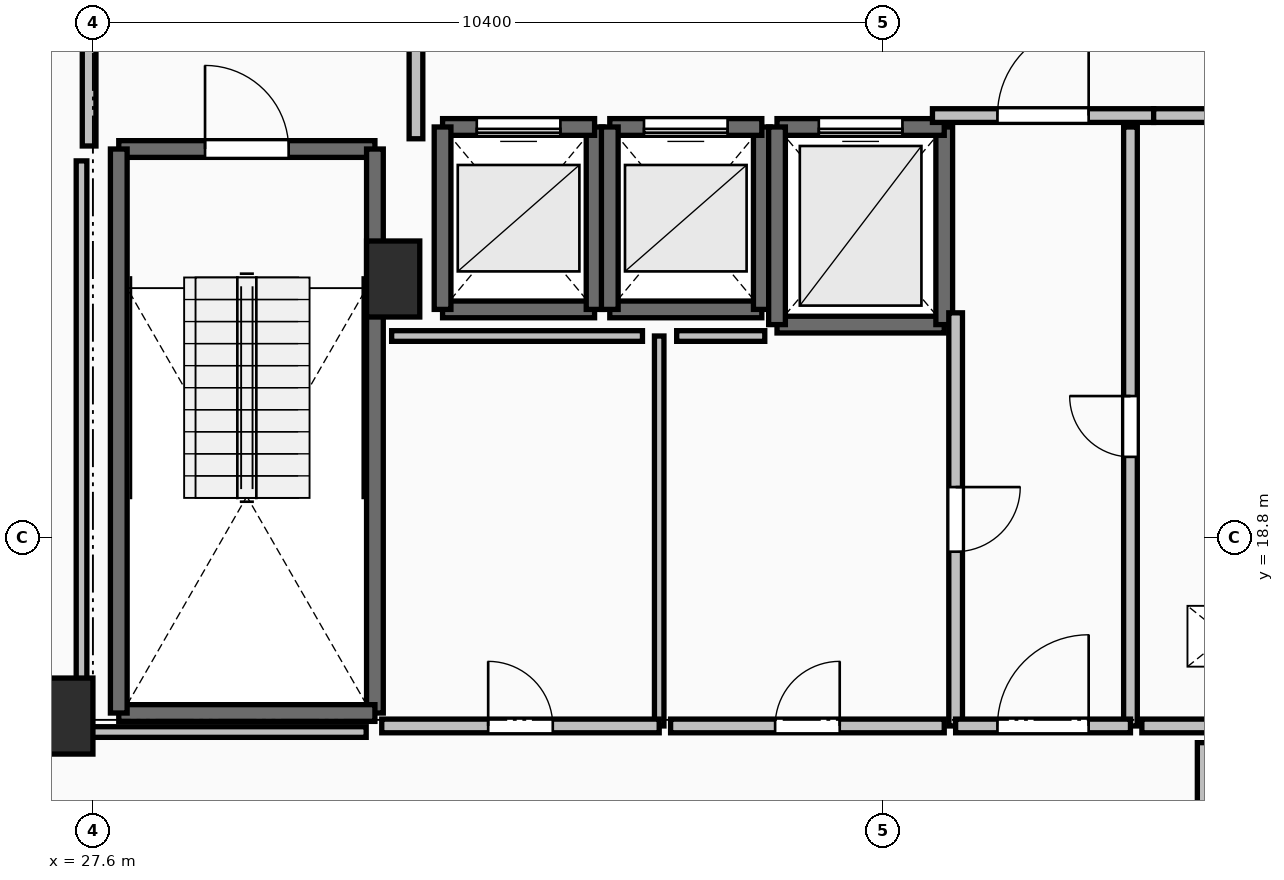
"""IFC4 building model, lengths in metres.
Left out: names, types, materials, properties, quantities, classifications, styles, units other than length and angle.
Written with IfcOpenShell. Run it as: python <this file> out.ifc"""

import sys

from ifc_helpers import new_model, si_unit, direction, frame, frame_2d, origin, origin_2d, place, context, subcontext, project, spatial, rectangle, extrude, element, fill, save


model = new_model("IFC4")
c1 = context("Model", 3, precision=1e-05, world=origin(), true_north=direction((0.0, 1.0)))
c2 = subcontext(c1, "Body", "Model", "MODEL_VIEW")
j1 = project(units=[si_unit("LENGTHUNIT", "METRE"), si_unit("PLANEANGLEUNIT", "RADIAN")], contexts=[c1])
p1 = place(None, origin())
s1 = spatial("IfcSite", under=j1, at=p1, CompositionType="ELEMENT")
p2 = place(p1, origin())
s2 = spatial("IfcBuilding", under=s1, at=p2, CompositionType="ELEMENT")
p3 = place(p2, frame((0.0, 0.0, 203.65)))
s3 = spatial("IfcBuildingStorey", under=s2, at=p3, CompositionType="ELEMENT", Elevation=203.65)
for number, where, z_axis, x_axis in (
    (1, (27.25, 16.45, 0.0), (0.0, 0.0, 1.0), (1.0, 0.0, 0.0)),
    (2, (31.55, 22.2, 0.0), (0.0, 0.0, 1.0), (1.0, 0.0, 0.0)),
):
    element("IfcColumn", number, at=place(p3, frame(where, z_axis=z_axis, x_axis=x_axis)), inside=s3, PredefinedType="PILASTER", context=c2, shape_type="SweptSolid", body=[
        extrude(rectangle(XDim=0.7, YDim=1.0, at=origin_2d()), origin(), (0.0, 0.0, 1.0), 3.55),
    ])
p4 = place(p3, frame((27.94, 23.91, 0.0), z_axis=(0.0, 0.0, 1.0), x_axis=(1.0, 0.0, 0.0)))
e3 = element("IfcWall", 3, at=p4, inside=s3, PredefinedType="SOLIDWALL", context=c2, shape_type="SweptSolid", body=[
    extrude(rectangle(XDim=3.37, YDim=0.22, at=frame_2d((1.685, 0.0))), origin(), (0.0, 0.0, 1.0), 3.29),
])
p5 = place(p4, frame((1.135, 0.0, 0.0)))
e4 = element("IfcOpeningElement", 4, at=p5, cuts=e3, PredefinedType="OPENING", context=c2, shape_type="SweptSolid", body=[
    extrude(rectangle(XDim=1.1, YDim=2.15, at=frame_2d((0.55, 1.075))), frame((0.0, 0.125, 0.0), z_axis=(0.0, -1.0, 0.0), x_axis=(1.0, 0.0, 0.0)), (0.0, 0.0, 1.0), 0.25),
])
p6 = place(p3, frame((31.31, 23.91, 0.0), z_axis=(0.0, 0.0, 1.0), x_axis=(0.0, -1.0, 0.0)))
e5 = element("IfcWall", 5, at=p6, inside=s3, PredefinedType="SOLIDWALL", context=c2, shape_type="SweptSolid", body=[
    extrude(rectangle(XDim=7.42, YDim=0.22, at=frame_2d((3.71, 0.0))), origin(), (0.0, 0.0, 1.0), 3.29),
])
p7 = place(p3, frame((31.31, 16.49, 0.0), z_axis=(0.0, 0.0, 1.0), x_axis=(-1.0, 0.0, 0.0)))
e6 = element("IfcWall", 6, at=p7, inside=s3, PredefinedType="SOLIDWALL", context=c2, shape_type="SweptSolid", body=[
    extrude(rectangle(XDim=3.37, YDim=0.22, at=frame_2d((1.685, 0.0))), origin(), (0.0, 0.0, 1.0), 3.29),
])
p8 = place(p3, frame((27.94, 16.49, 0.0), z_axis=(0.0, 0.0, 1.0), x_axis=(0.0, 1.0, 0.0)))
e7 = element("IfcWall", 7, at=p8, inside=s3, PredefinedType="SOLIDWALL", context=c2, shape_type="SweptSolid", body=[
    extrude(rectangle(XDim=7.42, YDim=0.22, at=frame_2d((3.71, 0.0))), origin(), (0.0, 0.0, 1.0), 3.29),
])
p9 = place(p3, frame((32.2, 21.8, 0.0), z_axis=(0.0, 0.0, 1.0), x_axis=(1.0, 0.0, 0.0)))
e8 = element("IfcWall", 8, at=p9, inside=s3, PredefinedType="SOLIDWALL", context=c2, shape_type="SweptSolid", body=[
    extrude(rectangle(XDim=2.0, YDim=0.22, at=frame_2d((1.0, 0.0))), origin(), (0.0, 0.0, 1.0), 3.29),
])
p10 = place(p3, frame((34.2, 21.8, 0.0), z_axis=(0.0, 0.0, 1.0), x_axis=(0.0, 1.0, 0.0)))
e9 = element("IfcWall", 9, at=p10, inside=s3, PredefinedType="SOLIDWALL", context=c2, shape_type="SweptSolid", body=[
    extrude(rectangle(XDim=2.4, YDim=0.22, at=frame_2d((1.2, 0.0))), origin(), (0.0, 0.0, 1.0), 3.29),
])
p11 = place(p3, frame((34.2, 24.2, 0.0), z_axis=(0.0, 0.0, 1.0), x_axis=(-1.0, 0.0, 0.0)))
e10 = element("IfcWall", 10, at=p11, inside=s3, PredefinedType="SOLIDWALL", context=c2, shape_type="SweptSolid", body=[
    extrude(rectangle(XDim=2.0, YDim=0.22, at=frame_2d((1.0, 0.0))), origin(), (0.0, 0.0, 1.0), 3.29),
])
p12 = place(p11, frame((0.45, 0.0, 0.0)))
e11 = element("IfcOpeningElement", 11, at=p12, cuts=e10, PredefinedType="OPENING", context=c2, shape_type="SweptSolid", body=[
    extrude(rectangle(XDim=1.1, YDim=2.2, at=frame_2d((0.55, 1.1))), frame((0.0, 0.125, 0.0), z_axis=(0.0, -1.0, 0.0), x_axis=(1.0, 0.0, 0.0)), (0.0, 0.0, 1.0), 0.25),
])
p13 = place(p3, frame((32.2, 24.2, 0.0), z_axis=(0.0, 0.0, 1.0), x_axis=(0.0, -1.0, 0.0)))
e12 = element("IfcWall", 12, at=p13, inside=s3, PredefinedType="SOLIDWALL", context=c2, shape_type="SweptSolid", body=[
    extrude(rectangle(XDim=2.4, YDim=0.22, at=frame_2d((1.2, 0.0))), origin(), (0.0, 0.0, 1.0), 3.29),
])
p14 = place(p3, frame((34.4, 21.8, 0.0), z_axis=(0.0, 0.0, 1.0), x_axis=(1.0, 0.0, 0.0)))
e13 = element("IfcWall", 13, at=p14, inside=s3, PredefinedType="SOLIDWALL", context=c2, shape_type="SweptSolid", body=[
    extrude(rectangle(XDim=2.0, YDim=0.22, at=frame_2d((1.0, 0.0))), origin(), (0.0, 0.0, 1.0), 3.29),
])
p15 = place(p3, frame((36.4, 21.8, 0.0), z_axis=(0.0, 0.0, 1.0), x_axis=(0.0, 1.0, 0.0)))
e14 = element("IfcWall", 14, at=p15, inside=s3, PredefinedType="SOLIDWALL", context=c2, shape_type="SweptSolid", body=[
    extrude(rectangle(XDim=2.4, YDim=0.22, at=frame_2d((1.2, 0.0))), origin(), (0.0, 0.0, 1.0), 3.29),
])
p16 = place(p3, frame((36.4, 24.2, 0.0), z_axis=(0.0, 0.0, 1.0), x_axis=(-1.0, 0.0, 0.0)))
e15 = element("IfcWall", 15, at=p16, inside=s3, PredefinedType="SOLIDWALL", context=c2, shape_type="SweptSolid", body=[
    extrude(rectangle(XDim=2.0, YDim=0.22, at=frame_2d((1.0, 0.0))), origin(), (0.0, 0.0, 1.0), 3.29),
])
p17 = place(p16, frame((0.45, 0.0, 0.0)))
e16 = element("IfcOpeningElement", 16, at=p17, cuts=e15, PredefinedType="OPENING", context=c2, shape_type="SweptSolid", body=[
    extrude(rectangle(XDim=1.1, YDim=2.2, at=frame_2d((0.55, 1.1))), frame((0.0, 0.125, 0.0), z_axis=(0.0, -1.0, 0.0), x_axis=(1.0, 0.0, 0.0)), (0.0, 0.0, 1.0), 0.25),
])
p18 = place(p3, frame((34.4, 24.2, 0.0), z_axis=(0.0, 0.0, 1.0), x_axis=(0.0, -1.0, 0.0)))
e17 = element("IfcWall", 17, at=p18, inside=s3, PredefinedType="SOLIDWALL", context=c2, shape_type="SweptSolid", body=[
    extrude(rectangle(XDim=2.4, YDim=0.22, at=frame_2d((1.2, 0.0))), origin(), (0.0, 0.0, 1.0), 3.29),
])
p19 = place(p3, frame((36.6, 21.6, 0.0), z_axis=(0.0, 0.0, 1.0), x_axis=(1.0, 0.0, 0.0)))
e18 = element("IfcWall", 18, at=p19, inside=s3, PredefinedType="SOLIDWALL", context=c2, shape_type="SweptSolid", body=[
    extrude(rectangle(XDim=2.2, YDim=0.22, at=frame_2d((1.1, 0.0))), origin(), (0.0, 0.0, 1.0), 3.29),
])
p20 = place(p3, frame((38.8, 21.6, 0.0), z_axis=(0.0, 0.0, 1.0), x_axis=(0.0, 1.0, 0.0)))
e19 = element("IfcWall", 19, at=p20, inside=s3, PredefinedType="SOLIDWALL", context=c2, shape_type="SweptSolid", body=[
    extrude(rectangle(XDim=2.6, YDim=0.22, at=frame_2d((1.3, 0.0))), origin(), (0.0, 0.0, 1.0), 3.29),
])
p21 = place(p3, frame((38.8, 24.2, 0.0), z_axis=(0.0, 0.0, 1.0), x_axis=(-1.0, 0.0, 0.0)))
e20 = element("IfcWall", 20, at=p21, inside=s3, PredefinedType="SOLIDWALL", context=c2, shape_type="SweptSolid", body=[
    extrude(rectangle(XDim=2.2, YDim=0.22, at=frame_2d((1.1, 0.0))), origin(), (0.0, 0.0, 1.0), 3.29),
])
p22 = place(p21, frame((0.55, 0.0, 0.0)))
e21 = element("IfcOpeningElement", 21, at=p22, cuts=e20, PredefinedType="OPENING", context=c2, shape_type="SweptSolid", body=[
    extrude(rectangle(XDim=1.1, YDim=2.2, at=frame_2d((0.55, 1.1))), frame((0.0, 0.125, 0.0), z_axis=(0.0, -1.0, 0.0), x_axis=(1.0, 0.0, 0.0)), (0.0, 0.0, 1.0), 0.25),
])
p23 = place(p3, frame((36.6, 24.2, 0.0), z_axis=(0.0, 0.0, 1.0), x_axis=(0.0, -1.0, 0.0)))
e22 = element("IfcWall", 22, at=p23, inside=s3, PredefinedType="SOLIDWALL", context=c2, shape_type="SweptSolid", body=[
    extrude(rectangle(XDim=2.6, YDim=0.22, at=frame_2d((1.3, 0.0))), origin(), (0.0, 0.0, 1.0), 3.29),
])
p24 = place(p3, frame((31.85, 24.045, 0.0), z_axis=(0.0, 0.0, 1.0), x_axis=(0.0, 1.0, 0.0)))
e23 = element("IfcWall", 23, at=p24, inside=s3, PredefinedType="PARTITIONING", context=c2, shape_type="SweptSolid", body=[
    extrude(rectangle(XDim=3.91, YDim=0.18, at=frame_2d((1.955, 0.0))), origin(), (0.0, 0.0, 1.0), 3.29),
])
p25 = place(p24, frame((1.355, 0.0, 0.0)))
e24 = element("IfcOpeningElement", 24, at=p25, cuts=e23, PredefinedType="OPENING", context=c2, shape_type="SweptSolid", body=[
    extrude(rectangle(XDim=1.2, YDim=2.15, at=frame_2d((0.6, 1.075))), frame((0.0, 0.105, 0.0), z_axis=(0.0, -1.0, 0.0), x_axis=(1.0, 0.0, 0.0)), (0.0, 0.0, 1.0), 0.21),
])
p26 = place(p3, frame((27.55, 28.0, 0.0), z_axis=(0.0, 0.0, 1.0), x_axis=(0.0, -1.0, 0.0)))
e25 = element("IfcWall", 25, at=p26, inside=s3, PredefinedType="PARTITIONING", context=c2, shape_type="SweptSolid", body=[
    extrude(rectangle(XDim=4.05, YDim=0.18, at=frame_2d((2.025, 0.0))), origin(), (0.0, 0.0, 1.0), 3.29),
])
p27 = place(p26, frame((1.425, 0.0, 0.0)))
e26 = element("IfcOpeningElement", 26, at=p27, cuts=e25, PredefinedType="OPENING", context=c2, shape_type="SweptSolid", body=[
    extrude(rectangle(XDim=1.2, YDim=2.15, at=frame_2d((0.6, 1.075))), frame((0.0, 0.105, 0.0), z_axis=(0.0, -1.0, 0.0), x_axis=(1.0, 0.0, 0.0)), (0.0, 0.0, 1.0), 0.21),
])
p28 = place(p3, frame((38.645, 24.35, 0.0), z_axis=(0.0, 0.0, 1.0), x_axis=(1.0, 0.0, 0.0)))
e27 = element("IfcWall", 27, at=p28, inside=s3, PredefinedType="PARTITIONING", context=c2, shape_type="SweptSolid", body=[
    extrude(rectangle(XDim=2.91, YDim=0.18, at=frame_2d((1.455, 0.0))), origin(), (0.0, 0.0, 1.0), 3.29),
])
p29 = place(p28, frame((0.855, 0.0, 0.0)))
e28 = element("IfcOpeningElement", 28, at=p29, cuts=e27, PredefinedType="OPENING", context=c2, shape_type="SweptSolid", body=[
    extrude(rectangle(XDim=1.2, YDim=2.15, at=frame_2d((0.6, 1.075))), frame((0.0, 0.105, 0.0), z_axis=(0.0, -1.0, 0.0), x_axis=(1.0, 0.0, 0.0)), (0.0, 0.0, 1.0), 0.21),
])
p30 = place(p3, frame((41.555, 24.35, 0.0), z_axis=(0.0, 0.0, 1.0), x_axis=(1.0, 0.0, 0.0)))
e29 = element("IfcWall", 29, at=p30, inside=s3, PredefinedType="PARTITIONING", context=c2, shape_type="SweptSolid", body=[
    extrude(rectangle(XDim=2.445, YDim=0.18, at=frame_2d((1.223, 0.0))), origin(), (0.0, 0.0, 1.0), 3.29),
])
p31 = place(p30, frame((0.823, 0.0, 0.0)))
e30 = element("IfcOpeningElement", 30, at=p31, cuts=e29, PredefinedType="OPENING", context=c2, shape_type="SweptSolid", body=[
    extrude(rectangle(XDim=0.8, YDim=2.05, at=frame_2d((0.4, 1.025))), frame((0.0, 0.105, 0.0), z_axis=(0.0, -1.0, 0.0), x_axis=(1.0, 0.0, 0.0)), (0.0, 0.0, 1.0), 0.21),
])
p32 = place(p3, frame((41.25, 16.32, 0.0), z_axis=(0.0, 0.0, 1.0), x_axis=(0.0, 1.0, 0.0)))
e31 = element("IfcWall", 31, at=p32, inside=s3, PredefinedType="PARTITIONING", context=c2, shape_type="SweptSolid", body=[
    extrude(rectangle(XDim=7.88, YDim=0.18, at=frame_2d((3.94, 0.0))), origin(), (0.0, 0.0, 1.0), 3.29),
])
p33 = place(p32, frame((3.54, 0.0, 0.0)))
e32 = element("IfcOpeningElement", 32, at=p33, cuts=e31, PredefinedType="OPENING", context=c2, shape_type="SweptSolid", body=[
    extrude(rectangle(XDim=0.8, YDim=2.05, at=frame_2d((0.4, 1.025))), frame((0.0, 0.105, 0.0), z_axis=(0.0, -1.0, 0.0), x_axis=(1.0, 0.0, 0.0)), (0.0, 0.0, 1.0), 0.21),
])
p34 = place(p3, frame((38.95, 21.755, 0.0), z_axis=(0.0, 0.0, 1.0), x_axis=(0.0, -1.0, 0.0)))
e33 = element("IfcWall", 33, at=p34, inside=s3, PredefinedType="PARTITIONING", context=c2, shape_type="SweptSolid", body=[
    extrude(rectangle(XDim=5.435, YDim=0.18, at=frame_2d((2.717, 0.0))), origin(), (0.0, 0.0, 1.0), 3.29),
])
p35 = place(p34, frame((2.292, 0.0, 0.0)))
e34 = element("IfcOpeningElement", 34, at=p35, cuts=e33, PredefinedType="OPENING", context=c2, shape_type="SweptSolid", body=[
    extrude(rectangle(XDim=0.85, YDim=2.1, at=frame_2d((0.425, 1.05))), frame((0.0, 0.105, 0.0), z_axis=(0.0, -1.0, 0.0), x_axis=(1.0, 0.0, 0.0)), (0.0, 0.0, 1.0), 0.21),
])
p36 = place(p3, frame((38.95, 16.32, 0.0), z_axis=(0.0, 0.0, 1.0), x_axis=(1.0, 0.0, 0.0)))
e35 = element("IfcWall", 35, at=p36, inside=s3, PredefinedType="PARTITIONING", context=c2, shape_type="SweptSolid", body=[
    extrude(rectangle(XDim=2.3, YDim=0.18, at=frame_2d((1.15, 0.0))), origin(), (0.0, 0.0, 1.0), 3.29),
])
p37 = place(p36, frame((0.55, 0.0, 0.0)))
e36 = element("IfcOpeningElement", 36, at=p37, cuts=e35, PredefinedType="OPENING", context=c2, shape_type="SweptSolid", body=[
    extrude(rectangle(XDim=1.2, YDim=2.15, at=frame_2d((0.6, 1.075))), frame((0.0, 0.105, 0.0), z_axis=(0.0, -1.0, 0.0), x_axis=(1.0, 0.0, 0.0)), (0.0, 0.0, 1.0), 0.21),
])
p38 = place(p3, frame((41.4, 16.32, 0.0), z_axis=(0.0, 0.0, 1.0), x_axis=(1.0, 0.0, 0.0)))
e37 = element("IfcWall", 37, at=p38, inside=s3, PredefinedType="PARTITIONING", context=c2, shape_type="SweptSolid", body=[
    extrude(rectangle(XDim=3.2, YDim=0.18, at=frame_2d((1.6, 0.0))), origin(), (0.0, 0.0, 1.0), 3.29),
])
p39 = place(p38, frame((1.2, 0.0, 0.0)))
e38 = element("IfcOpeningElement", 38, at=p39, cuts=e37, PredefinedType="OPENING", context=c2, shape_type="SweptSolid", body=[
    extrude(rectangle(XDim=0.8, YDim=2.05, at=frame_2d((0.4, 1.025))), frame((0.0, 0.105, 0.0), z_axis=(0.0, -1.0, 0.0), x_axis=(1.0, 0.0, 0.0)), (0.0, 0.0, 1.0), 0.21),
])
p40 = place(p3, frame((35.05, 16.32, 0.0), z_axis=(0.0, 0.0, 1.0), x_axis=(0.0, 1.0, 0.0)))
e39 = element("IfcWall", 39, at=p40, inside=s3, PredefinedType="PARTITIONING", context=c2, shape_type="SweptSolid", body=[
    extrude(rectangle(XDim=5.13, YDim=0.125, at=frame_2d((2.565, 0.0))), origin(), (0.0, 0.0, 1.0), 3.29),
])
p41 = place(p3, frame((31.4, 16.32, 0.0), z_axis=(0.0, 0.0, 1.0), x_axis=(1.0, 0.0, 0.0)))
e40 = element("IfcWall", 40, at=p41, inside=s3, PredefinedType="PARTITIONING", context=c2, shape_type="SweptSolid", body=[
    extrude(rectangle(XDim=3.65, YDim=0.18, at=frame_2d((1.825, 0.0))), origin(), (0.0, 0.0, 1.0), 3.29),
])
p42 = place(p41, frame((1.4, 0.0, 0.0)))
e41 = element("IfcOpeningElement", 41, at=p42, cuts=e40, PredefinedType="OPENING", context=c2, shape_type="SweptSolid", body=[
    extrude(rectangle(XDim=0.85, YDim=2.1, at=frame_2d((0.425, 1.05))), frame((0.0, 0.105, 0.0), z_axis=(0.0, -1.0, 0.0), x_axis=(1.0, 0.0, 0.0)), (0.0, 0.0, 1.0), 0.21),
])
p43 = place(p3, frame((35.2, 16.32, 0.0), z_axis=(0.0, 0.0, 1.0), x_axis=(1.0, 0.0, 0.0)))
e42 = element("IfcWall", 42, at=p43, inside=s3, PredefinedType="PARTITIONING", context=c2, shape_type="SweptSolid", body=[
    extrude(rectangle(XDim=3.6, YDim=0.18, at=frame_2d((1.8, 0.0))), origin(), (0.0, 0.0, 1.0), 3.29),
])
p44 = place(p43, frame((1.375, 0.0, 0.0)))
e43 = element("IfcOpeningElement", 43, at=p44, cuts=e42, PredefinedType="OPENING", context=c2, shape_type="SweptSolid", body=[
    extrude(rectangle(XDim=0.85, YDim=2.1, at=frame_2d((0.425, 1.05))), frame((0.0, 0.105, 0.0), z_axis=(0.0, -1.0, 0.0), x_axis=(1.0, 0.0, 0.0)), (0.0, 0.0, 1.0), 0.21),
])
p45 = place(p3, frame((34.83, 21.45, 0.0), z_axis=(0.0, 0.0, 1.0), x_axis=(-1.0, 0.0, 0.0)))
e44 = element("IfcWall", 44, at=p45, inside=s3, PredefinedType="PARTITIONING", context=c2, shape_type="SweptSolid", body=[
    extrude(rectangle(XDim=3.3, YDim=0.14, at=frame_2d((1.65, 0.0))), origin(), (0.0, 0.0, 1.0), 3.29),
])
p46 = place(p3, frame((36.439, 21.45, 0.0), z_axis=(0.0, 0.0, 1.0), x_axis=(-1.0, 0.0, 0.0)))
e45 = element("IfcWall", 45, at=p46, inside=s3, PredefinedType="PARTITIONING", context=c2, shape_type="SweptSolid", body=[
    extrude(rectangle(XDim=1.159, YDim=0.14, at=frame_2d((0.58, 0.0))), origin(), (0.0, 0.0, 1.0), 3.29),
])
p47 = place(p3, frame((27.45, 23.754, 0.0), z_axis=(0.0, 0.0, 1.0), x_axis=(0.0, -1.0, 0.0)))
e46 = element("IfcWall", 46, at=p47, inside=s3, PredefinedType="PARTITIONING", context=c2, shape_type="SweptSolid", body=[
    extrude(rectangle(XDim=7.514, YDim=0.14, at=frame_2d((3.757, 0.0))), origin(), (0.0, 0.0, 1.0), 2.482),
])
p48 = place(p3, frame((27.45, 16.24, 0.0), z_axis=(0.0, 0.0, 1.0), x_axis=(1.0, 0.0, 0.0)))
e47 = element("IfcWall", 47, at=p48, inside=s3, PredefinedType="PARTITIONING", context=c2, shape_type="SweptSolid", body=[
    extrude(rectangle(XDim=3.745, YDim=0.14, at=frame_2d((1.873, 0.0))), origin(), (0.0, 0.0, 1.0), 2.482),
])
p49 = place(p3, frame((42.2, 16.1, 0.0), z_axis=(0.0, 0.0, 1.0), x_axis=(0.0, -1.0, 0.0)))
e48 = element("IfcWall", 48, at=p49, inside=s3, PredefinedType="PARTITIONING", context=c2, shape_type="SweptSolid", body=[
    extrude(rectangle(XDim=1.83, YDim=0.14, at=frame_2d((0.915, 0.0))), origin(), (0.0, 0.0, 1.0), 3.29),
])
p50 = place(p5, origin())
e49 = element("IfcDoor", 49, at=p50, inside=s3, OperationType="SINGLE_SWING_LEFT", PredefinedType="DOOR", context=c2, shape_type="SweptSolid", body=[
    extrude(rectangle(XDim=1.1, YDim=2.15, at=frame_2d((0.55, 1.075))), frame((0.0, 0.025, 0.0), z_axis=(0.0, -1.0, 0.0), x_axis=(1.0, 0.0, 0.0)), (0.0, 0.0, 1.0), 0.05),
])
fill(e4, e49)
p51 = place(p12, origin())
e50 = element("IfcDoor", 50, at=p51, inside=s3, OperationType="SLIDING_TO_LEFT", PredefinedType="DOOR", context=c2, shape_type="SweptSolid", body=[
    extrude(rectangle(XDim=1.1, YDim=2.2, at=frame_2d((0.55, 1.1))), frame((0.0, 0.025, 0.0), z_axis=(0.0, -1.0, 0.0), x_axis=(1.0, 0.0, 0.0)), (0.0, 0.0, 1.0), 0.05),
])
fill(e11, e50)
p52 = place(p17, origin())
e51 = element("IfcDoor", 51, at=p52, inside=s3, OperationType="SLIDING_TO_LEFT", PredefinedType="DOOR", context=c2, shape_type="SweptSolid", body=[
    extrude(rectangle(XDim=1.1, YDim=2.2, at=frame_2d((0.55, 1.1))), frame((0.0, 0.025, 0.0), z_axis=(0.0, -1.0, 0.0), x_axis=(1.0, 0.0, 0.0)), (0.0, 0.0, 1.0), 0.05),
])
fill(e16, e51)
p53 = place(p22, origin())
e52 = element("IfcDoor", 52, at=p53, inside=s3, OperationType="SLIDING_TO_LEFT", PredefinedType="DOOR", context=c2, shape_type="SweptSolid", body=[
    extrude(rectangle(XDim=1.1, YDim=2.2, at=frame_2d((0.55, 1.1))), frame((0.0, 0.025, 0.0), z_axis=(0.0, -1.0, 0.0), x_axis=(1.0, 0.0, 0.0)), (0.0, 0.0, 1.0), 0.05),
])
fill(e21, e52)
p54 = place(p29, origin())
e53 = element("IfcDoor", 53, at=p54, inside=s3, OperationType="SINGLE_SWING_RIGHT", PredefinedType="DOOR", context=c2, shape_type="SweptSolid", body=[
    extrude(rectangle(XDim=1.2, YDim=2.15, at=frame_2d((0.6, 1.075))), frame((0.0, 0.025, 0.0), z_axis=(0.0, -1.0, 0.0), x_axis=(1.0, 0.0, 0.0)), (0.0, 0.0, 1.0), 0.05),
])
fill(e28, e53)
p55 = place(p33, origin())
e54 = element("IfcDoor", 54, at=p55, inside=s3, OperationType="SINGLE_SWING_RIGHT", PredefinedType="DOOR", context=c2, shape_type="SweptSolid", body=[
    extrude(rectangle(XDim=0.8, YDim=2.05, at=frame_2d((0.4, 1.025))), frame((0.0, 0.025, 0.0), z_axis=(0.0, -1.0, 0.0), x_axis=(1.0, 0.0, 0.0)), (0.0, 0.0, 1.0), 0.05),
])
fill(e32, e54)
p56 = place(p35, origin())
e55 = element("IfcDoor", 55, at=p56, inside=s3, OperationType="SINGLE_SWING_LEFT", PredefinedType="DOOR", context=c2, shape_type="SweptSolid", body=[
    extrude(rectangle(XDim=0.85, YDim=2.1, at=frame_2d((0.425, 1.05))), frame((0.0, 0.025, 0.0), z_axis=(0.0, -1.0, 0.0), x_axis=(1.0, 0.0, 0.0)), (0.0, 0.0, 1.0), 0.05),
])
fill(e34, e55)
p57 = place(p37, origin())
e56 = element("IfcDoor", 56, at=p57, inside=s3, OperationType="SINGLE_SWING_RIGHT", PredefinedType="DOOR", context=c2, shape_type="SweptSolid", body=[
    extrude(rectangle(XDim=1.2, YDim=2.15, at=frame_2d((0.6, 1.075))), frame((0.0, 0.025, 0.0), z_axis=(0.0, -1.0, 0.0), x_axis=(1.0, 0.0, 0.0)), (0.0, 0.0, 1.0), 0.05),
])
fill(e36, e56)
p58 = place(p42, origin())
e57 = element("IfcDoor", 57, at=p58, inside=s3, OperationType="SINGLE_SWING_LEFT", PredefinedType="DOOR", context=c2, shape_type="SweptSolid", body=[
    extrude(rectangle(XDim=0.85, YDim=2.1, at=frame_2d((0.425, 1.05))), frame((0.0, 0.025, 0.0), z_axis=(0.0, -1.0, 0.0), x_axis=(1.0, 0.0, 0.0)), (0.0, 0.0, 1.0), 0.05),
])
fill(e41, e57)
p59 = place(p44, origin())
e58 = element("IfcDoor", 58, at=p59, inside=s3, OperationType="SINGLE_SWING_RIGHT", PredefinedType="DOOR", context=c2, shape_type="SweptSolid", body=[
    extrude(rectangle(XDim=0.85, YDim=2.1, at=frame_2d((0.425, 1.05))), frame((0.0, 0.025, 0.0), z_axis=(0.0, -1.0, 0.0), x_axis=(1.0, 0.0, 0.0)), (0.0, 0.0, 1.0), 0.05),
])
fill(e43, e58)
save(model, sys.argv[1])
